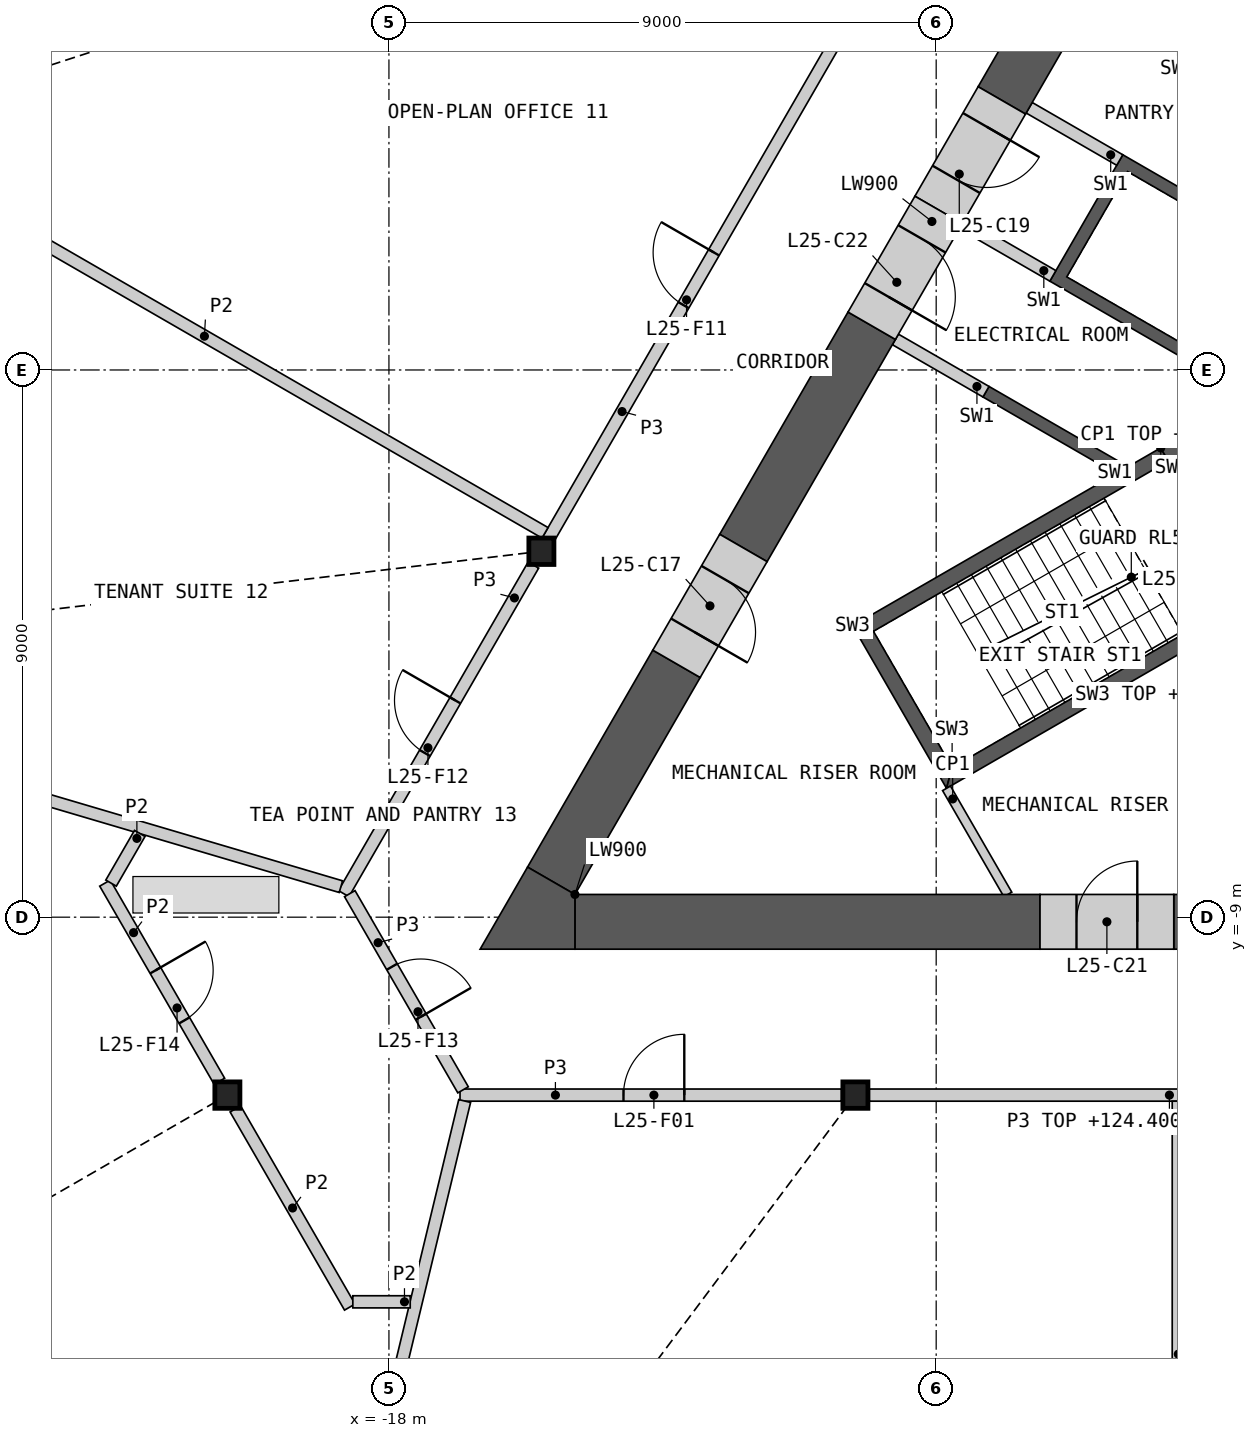
"""IFC4 building model, lengths in metres.
Left out: names, types, materials, properties, quantities, classifications, styles, units other than length and angle.
Written with IfcOpenShell. Run it as: python <this file> out.ifc"""

import sys

from ifc_helpers import new_model, si_unit, direction, frame, frame_2d, origin, origin_2d, place, context, subcontext, project, spatial, polyline, rectangle, i_section, outline, extrude, element, fill, save


model = new_model("IFC4")
c1 = context("Model", 3, precision=1e-05, world=origin(), true_north=direction((0.0, 1.0)))
c2 = subcontext(c1, "Body", "Model", "MODEL_VIEW")
j1 = project(units=[si_unit("LENGTHUNIT", "METRE"), si_unit("PLANEANGLEUNIT", "RADIAN")], contexts=[c1])
p1 = place(None, origin())
s1 = spatial("IfcSite", under=j1, at=p1, CompositionType="ELEMENT")
p2 = place(p1, origin())
s2 = spatial("IfcBuilding", under=s1, at=p2, CompositionType="ELEMENT")
p3 = place(p2, frame((0.0, 0.0, 120.6)))
s3 = spatial("IfcBuildingStorey", under=s2, at=p3, CompositionType="ELEMENT", Elevation=120.6)
for number, where, z_axis, x_axis in (
    (1, (-15.493, -2.982, 0.0), (0.0, 0.0, 1.0), (1.0, 0.0, 0.0)),
    (2, (-20.657, -11.926, 0.0), (0.0, 0.0, 1.0), (1.0, 0.0, 0.0)),
    (3, (-10.328, -11.926, 0.0), (0.0, 0.0, 1.0), (1.0, 0.0, 0.0)),
):
    element("IfcColumn", number, at=place(p3, frame(where, z_axis=z_axis, x_axis=x_axis)), inside=s3, PredefinedType="COLUMN", context=c2, shape_type="SweptSolid", body=[
        extrude(i_section(OverallWidth=0.412, OverallDepth=0.435, WebThickness=0.036, FlangeThickness=0.057, at=origin_2d()), origin(), (0.0, 0.0, 1.0), 4.2),
    ])
p4 = place(p3, origin())
e4 = element("IfcWall", 4, at=p4, inside=s3, PredefinedType="SHEAR", context=c2, shape_type="SweptSolid", body=[
    extrude(outline(polyline([(-6.061, -1.697), (-8.231, -0.444), (-8.131, -0.271), (-5.96, -1.524), (-6.061, -1.697)])), origin(), (0.0, 0.0, 1.0), 3.8),
])
p5 = place(p3, origin())
e5 = element("IfcWall", 5, at=p5, inside=s3, PredefinedType="SHEAR", context=c2, shape_type="SweptSolid", body=[
    extrude(outline(polyline([(-4.96, 0.208), (-7.131, 1.461), (-5.931, 3.54), (-3.76, 2.287), (-3.861, 2.113), (-5.852, 3.263), (-6.852, 1.531), (-4.861, 0.381), (-4.96, 0.208)])), origin(), (0.0, 0.0, 1.0), 3.8),
])
p6 = place(p3, frame((-5.981, 3.453, 0.0), z_axis=(0.0, 0.0, 1.0), x_axis=(-0.866060346521, 0.499939472521, 0.0)))
e6 = element("IfcWall", 6, at=p6, inside=s3, PredefinedType="SHEAR", context=c2, shape_type="SweptSolid", body=[
    extrude(rectangle(XDim=1.72, YDim=0.2, at=frame_2d((0.86, 0.0))), origin(), (0.0, 0.0, 1.0), 3.8),
])
for number, where, z_axis, x_axis in (
    (7, (-7.081, 1.548, 0.0), (0.0, 0.0, 1.0), (-0.866, 0.5, 0.0)),
    (8, (-8.181, -0.357, 0.0), (0.0, 0.0, 1.0), (-0.866, 0.5, 0.0)),
):
    element("IfcWall", number, at=place(p3, frame(where, z_axis=z_axis, x_axis=x_axis)), inside=s3, PredefinedType="SHEAR", context=c2, shape_type="SweptSolid", body=[
        extrude(rectangle(XDim=1.72, YDim=0.2, at=frame_2d((0.86, 0.0))), origin(), (0.0, 0.0, 1.0), 3.8),
    ])
p7 = place(p3, origin())
e9 = element("IfcWall", 9, at=p7, inside=s3, PredefinedType="SHEAR", context=c2, shape_type="SweptSolid", body=[
    extrude(outline(polyline([(-5.307, -1.281), (-10.374, -4.206), (-10.032, -4.298), (-5.182, -1.498), (-5.307, -1.281)])), origin(), (0.0, 0.0, 1.0), 3.8),
])
p8 = place(p3, origin())
e10 = element("IfcWall", 10, at=p8, inside=s3, PredefinedType="SHEAR", context=c2, shape_type="SweptSolid", body=[
    extrude(outline(polyline([(-10.374, -4.206), (-8.83, -6.881), (-8.738, -6.539), (-10.032, -4.298), (-10.374, -4.206)])), origin(), (0.0, 0.0, 1.0), 3.8),
])
p9 = place(p3, origin())
e11 = element("IfcWall", 11, at=p9, inside=s3, PredefinedType="SHEAR", context=c2, shape_type="SweptSolid", body=[
    extrude(outline(polyline([(-8.738, -6.539), (-8.83, -6.881), (-3.763, -3.956), (-3.888, -3.739), (-8.738, -6.539)])), origin(), (0.0, 0.0, 1.0), 3.8),
])
p10 = place(p3, frame((-5.199, -1.219, 0.0), z_axis=(0.0, 0.0, 1.0), x_axis=(0.499982516597, -0.866035497597, 0.0)))
e12 = element("IfcWall", 12, at=p10, inside=s3, PredefinedType="SHEAR", context=c2, shape_type="SweptSolid", body=[
    extrude(rectangle(XDim=3.088, YDim=0.25, at=frame_2d((1.544, 0.0))), origin(), (0.0, 0.0, 1.0), 3.8),
])
p11 = place(p10, frame((0.994, 0.0, 0.0)))
e13 = element("IfcOpeningElement", 13, at=p11, cuts=e12, PredefinedType="OPENING", context=c2, shape_type="SweptSolid", body=[
    extrude(rectangle(XDim=1.1, YDim=2.1, at=frame_2d((0.55, 1.05))), frame((0.0, 0.135, 0.0), z_axis=(0.0, -1.0, 0.0), x_axis=(1.0, 0.0, 0.0)), (0.0, 0.0, 1.0), 0.27),
])
p12 = place(p3, frame((-8.83, -6.881, 0.0), z_axis=(0.0, 0.0, 1.0), x_axis=(0.500085890408, -0.865975809255, 0.0)))
e14 = element("IfcWall", 14, at=p12, inside=s3, PredefinedType="PARTITIONING", context=c2, shape_type="SweptSolid", body=[
    extrude(rectangle(XDim=2.016, YDim=0.15, at=frame_2d((1.008, 0.0))), origin(), (0.0, 0.0, 1.0), 3.8),
])
p13 = place(p3, frame((-14.941, -9.076, 0.0), z_axis=(0.0, 0.0, 1.0), x_axis=(1.0, 0.0, 0.0)))
e15 = element("IfcWall", 15, at=p13, inside=s3, PredefinedType="SHEAR", context=c2, shape_type="SweptSolid", body=[
    extrude(rectangle(XDim=7.649, YDim=0.9, at=frame_2d((3.824, 0.0))), origin(), (0.0, 0.0, 1.0), 3.8),
])
p14 = place(p3, frame((-5.093, -9.076, 0.0), z_axis=(0.0, 0.0, 1.0), x_axis=(1.0, 0.0, 0.0)))
e16 = element("IfcWall", 16, at=p14, inside=s3, PredefinedType="SHEAR", context=c2, shape_type="SweptSolid", body=[
    extrude(rectangle(XDim=3.992, YDim=0.9, at=frame_2d((1.996, 0.0))), origin(), (0.0, 0.0, 1.0), 3.8),
])
p15 = place(p3, frame((-3.55, 12.004, 0.0), z_axis=(0.0, 0.0, 1.0), x_axis=(-0.499993245289, -0.866029303583, 0.0)))
e17 = element("IfcWall", 17, at=p15, inside=s3, PredefinedType="SHEAR", context=c2, shape_type="SweptSolid", body=[
    extrude(rectangle(XDim=8.741, YDim=0.9, at=frame_2d((4.37, 0.0))), origin(), (0.0, 0.0, 1.0), 3.8),
])
p16 = place(p3, frame((-10.06, 0.728, 0.0), z_axis=(0.0, 0.0, 1.0), x_axis=(-0.500021220092, -0.866013152012, 0.0)))
e18 = element("IfcWall", 18, at=p16, inside=s3, PredefinedType="SHEAR", context=c2, shape_type="SweptSolid", body=[
    extrude(rectangle(XDim=4.22, YDim=0.9, at=frame_2d((2.11, 0.0))), origin(), (0.0, 0.0, 1.0), 3.8),
])
p17 = place(p3, frame((-13.271, -4.833, 0.0), z_axis=(0.0, 0.0, 1.0), x_axis=(-0.499994272862, -0.866028710324, 0.0)))
e19 = element("IfcWall", 19, at=p17, inside=s3, PredefinedType="SHEAR", context=c2, shape_type="SweptSolid", body=[
    extrude(rectangle(XDim=4.121, YDim=0.9, at=frame_2d((2.06, 0.0))), origin(), (0.0, 0.0, 1.0), 3.8),
])
p18 = place(p3, origin())
e20 = element("IfcWall", 20, at=p18, inside=s3, PredefinedType="SHEAR", context=c2, shape_type="SweptSolid", body=[
    extrude(outline(polyline([(-14.941, -8.626), (-14.941, -9.526), (-16.5, -9.526), (-15.721, -8.176), (-14.941, -8.626)])), origin(), (0.0, 0.0, 1.0), 3.8),
])
p19 = place(p3, frame((-12.171, -2.927, 0.0), z_axis=(0.0, 0.0, 1.0), x_axis=(-0.499946605688, -0.86605622881, 0.0)))
e21 = element("IfcWall", 21, at=p19, inside=s3, PredefinedType="SHEAR", context=c2, shape_type="SweptSolid", body=[
    extrude(rectangle(XDim=2.2, YDim=0.9, at=frame_2d((1.1, 0.0))), origin(), (0.0, 0.0, 1.0), 3.8),
])
p20 = place(p19, frame((0.6, 0.0, 0.0)))
e22 = element("IfcOpeningElement", 22, at=p20, cuts=e21, PredefinedType="OPENING", context=c2, shape_type="SweptSolid", body=[
    extrude(rectangle(XDim=1.0, YDim=2.1, at=frame_2d((0.5, 1.05))), frame((0.0, 0.46, 0.0), z_axis=(0.0, -1.0, 0.0), x_axis=(1.0, 0.0, 0.0)), (0.0, 0.0, 1.0), 0.92),
])
p21 = place(p3, frame((-7.92, 4.434, 0.0), z_axis=(0.0, 0.0, 1.0), x_axis=(-0.499939227269, -0.866060488094, 0.0)))
e23 = element("IfcWall", 23, at=p21, inside=s3, PredefinedType="SHEAR", context=c2, shape_type="SweptSolid", body=[
    extrude(rectangle(XDim=2.08, YDim=0.9, at=frame_2d((1.04, 0.0))), origin(), (0.0, 0.0, 1.0), 3.8),
])
p22 = place(p21, frame((0.5, 0.0, 0.0)))
e24 = element("IfcOpeningElement", 24, at=p22, cuts=e23, PredefinedType="OPENING", context=c2, shape_type="SweptSolid", body=[
    extrude(rectangle(XDim=1.0, YDim=2.1, at=frame_2d((0.5, 1.05))), frame((0.0, 0.46, 0.0), z_axis=(0.0, -1.0, 0.0), x_axis=(1.0, 0.0, 0.0)), (0.0, 0.0, 1.0), 0.92),
])
p23 = place(p3, frame((-7.292, -9.076, 0.0), z_axis=(0.0, 0.0, 1.0), x_axis=(1.0, 0.0, 0.0)))
e25 = element("IfcWall", 25, at=p23, inside=s3, PredefinedType="SHEAR", context=c2, shape_type="SweptSolid", body=[
    extrude(rectangle(XDim=2.2, YDim=0.9, at=frame_2d((1.1, 0.0))), origin(), (0.0, 0.0, 1.0), 3.8),
])
p24 = place(p23, frame((0.6, 0.0, 0.0)))
e26 = element("IfcOpeningElement", 26, at=p24, cuts=e25, PredefinedType="OPENING", context=c2, shape_type="SweptSolid", body=[
    extrude(rectangle(XDim=1.0, YDim=2.1, at=frame_2d((0.5, 1.05))), frame((0.0, 0.46, 0.0), z_axis=(0.0, -1.0, 0.0), x_axis=(1.0, 0.0, 0.0)), (0.0, 0.0, 1.0), 0.92),
])
p25 = place(p3, frame((-8.96, 2.633, 0.0), z_axis=(0.0, 0.0, 1.0), x_axis=(-0.50002983664, -0.866008176907, 0.0)))
e27 = element("IfcWall", 27, at=p25, inside=s3, PredefinedType="SHEAR", context=c2, shape_type="SweptSolid", body=[
    extrude(rectangle(XDim=2.2, YDim=0.9, at=frame_2d((1.1, 0.0))), origin(), (0.0, 0.0, 1.0), 3.8),
])
p26 = place(p25, frame((0.55, 0.0, 0.0)))
e28 = element("IfcOpeningElement", 28, at=p26, cuts=e27, PredefinedType="OPENING", context=c2, shape_type="SweptSolid", body=[
    extrude(rectangle(XDim=1.1, YDim=2.1, at=frame_2d((0.55, 1.05))), frame((0.0, 0.46, 0.0), z_axis=(0.0, -1.0, 0.0), x_axis=(1.0, 0.0, 0.0)), (0.0, 0.0, 1.0), 0.92),
])
p27 = place(p3, frame((-10.101, -11.926, 0.0), z_axis=(0.0, 0.0, 1.0), x_axis=(1.0, 0.0, 0.0)))
e29 = element("IfcWall", 29, at=p27, inside=s3, PredefinedType="PARTITIONING", context=c2, shape_type="SweptSolid", body=[
    extrude(rectangle(XDim=9.874, YDim=0.2, at=frame_2d((4.937, 0.0))), origin(), (0.0, 0.0, 1.0), 3.8),
])
p28 = place(p27, frame((7.01, 0.0, 0.0)))
e30 = element("IfcOpeningElement", 30, at=p28, cuts=e29, PredefinedType="OPENING", context=c2, shape_type="SweptSolid", body=[
    extrude(rectangle(XDim=1.0, YDim=2.1, at=frame_2d((0.5, 1.05))), frame((0.0, 0.11, 0.0), z_axis=(0.0, -1.0, 0.0), x_axis=(1.0, 0.0, 0.0)), (0.0, 0.0, 1.0), 0.22),
])
p29 = place(p3, frame((-15.402, -2.823, 0.0), z_axis=(0.0, 0.0, 1.0), x_axis=(0.500023237168, 0.866011987384, 0.0)))
e31 = element("IfcWall", 31, at=p29, inside=s3, PredefinedType="PARTITIONING", context=c2, shape_type="SweptSolid", body=[
    extrude(rectangle(XDim=9.883, YDim=0.2, at=frame_2d((4.942, 0.0))), origin(), (0.0, 0.0, 1.0), 3.8),
])
p30 = place(p29, frame((4.492, 0.0, 0.0)))
e32 = element("IfcOpeningElement", 32, at=p30, cuts=e31, PredefinedType="OPENING", context=c2, shape_type="SweptSolid", body=[
    extrude(rectangle(XDim=1.0, YDim=2.1, at=frame_2d((0.5, 1.05))), frame((0.0, 0.11, 0.0), z_axis=(0.0, -1.0, 0.0), x_axis=(1.0, 0.0, 0.0)), (0.0, 0.0, 1.0), 0.22),
])
p31 = place(p3, frame((-16.831, -11.926, 0.0), z_axis=(0.0, 0.0, 1.0), x_axis=(1.0, 0.0, 0.0)))
e33 = element("IfcWall", 33, at=p31, inside=s3, PredefinedType="PARTITIONING", context=c2, shape_type="SweptSolid", body=[
    extrude(rectangle(XDim=6.275, YDim=0.2, at=frame_2d((3.137, 0.0))), origin(), (0.0, 0.0, 1.0), 3.8),
])
p32 = place(p31, frame((2.688, 0.0, 0.0)))
e34 = element("IfcOpeningElement", 34, at=p32, cuts=e33, PredefinedType="OPENING", context=c2, shape_type="SweptSolid", body=[
    extrude(rectangle(XDim=1.0, YDim=2.1, at=frame_2d((0.5, 1.05))), frame((0.0, 0.11, 0.0), z_axis=(0.0, -1.0, 0.0), x_axis=(1.0, 0.0, 0.0)), (0.0, 0.0, 1.0), 0.22),
])
p33 = place(p3, frame((-18.744, -8.613, 0.0), z_axis=(0.0, 0.0, 1.0), x_axis=(0.499997920671, 0.866026604282, 0.0)))
e35 = element("IfcWall", 35, at=p33, inside=s3, PredefinedType="PARTITIONING", context=c2, shape_type="SweptSolid", body=[
    extrude(rectangle(XDim=6.24, YDim=0.2, at=frame_2d((3.12, 0.0))), origin(), (0.0, 0.0, 1.0), 3.8),
])
p34 = place(p33, frame((2.67, 0.0, 0.0)))
e36 = element("IfcOpeningElement", 36, at=p34, cuts=e35, PredefinedType="OPENING", context=c2, shape_type="SweptSolid", body=[
    extrude(rectangle(XDim=1.0, YDim=2.1, at=frame_2d((0.5, 1.05))), frame((0.0, 0.11, 0.0), z_axis=(0.0, -1.0, 0.0), x_axis=(1.0, 0.0, 0.0)), (0.0, 0.0, 1.0), 0.22),
])
p35 = place(p3, frame((-18.644, -8.613, 0.0), z_axis=(0.0, 0.0, 1.0), x_axis=(0.499958791762, -0.866049194065, 0.0)))
e37 = element("IfcWall", 37, at=p35, inside=s3, PredefinedType="PARTITIONING", context=c2, shape_type="SweptSolid", body=[
    extrude(rectangle(XDim=3.726, YDim=0.2, at=frame_2d((1.863, 0.0))), origin(), (0.0, 0.0, 1.0), 3.8),
])
p36 = place(p35, frame((1.388, 0.0, 0.0)))
e38 = element("IfcOpeningElement", 38, at=p36, cuts=e37, PredefinedType="OPENING", context=c2, shape_type="SweptSolid", body=[
    extrude(rectangle(XDim=0.95, YDim=2.1, at=frame_2d((0.475, 1.05))), frame((0.0, 0.11, 0.0), z_axis=(0.0, -1.0, 0.0), x_axis=(1.0, 0.0, 0.0)), (0.0, 0.0, 1.0), 0.22),
])
p37 = place(p3, frame((-19.94, -25.244, 0.0), z_axis=(0.0, 0.0, 1.0), x_axis=(0.234226353532, 0.972182089586, 0.0)))
e39 = element("IfcWall", 39, at=p37, inside=s3, PredefinedType="PARTITIONING", context=c2, shape_type="SweptSolid", body=[
    extrude(rectangle(XDim=13.599, YDim=0.2, at=frame_2d((6.8, 0.0))), origin(), (0.0, 0.0, 1.0), 2.885),
])
p38 = place(p3, frame((-31.736, -4.675, 0.0), z_axis=(0.0, 0.0, 1.0), x_axis=(0.959053889024, -0.283223653581, 0.0)))
e40 = element("IfcWall", 40, at=p38, inside=s3, PredefinedType="PARTITIONING", context=c2, shape_type="SweptSolid", body=[
    extrude(rectangle(XDim=13.499, YDim=0.2, at=frame_2d((6.75, 0.0))), origin(), (0.0, 0.0, 1.0), 2.885),
])
p39 = place(p3, frame((-26.636, 3.79, 0.0), z_axis=(0.0, 0.0, 1.0), x_axis=(0.866029074283, -0.499993642455, 0.0)))
e41 = element("IfcWall", 41, at=p39, inside=s3, PredefinedType="PARTITIONING", context=c2, shape_type="SweptSolid", body=[
    extrude(rectangle(XDim=12.936, YDim=0.2, at=frame_2d((6.468, 0.0))), origin(), (0.0, 0.0, 1.0), 2.885),
])
p40 = place(p3, frame((-5.018, -20.347, 0.0), z_axis=(0.0, 0.0, 1.0), x_axis=(0.0, 1.0, 0.0)))
e42 = element("IfcWall", 42, at=p40, inside=s3, PredefinedType="PARTITIONING", context=c2, shape_type="SweptSolid", body=[
    extrude(rectangle(XDim=8.321, YDim=0.2, at=frame_2d((4.16, 0.0))), origin(), (0.0, 0.0, 1.0), 2.885),
])
p41 = place(p3, frame((-20.526, -12.154, 0.0), z_axis=(0.0, 0.0, 1.0), x_axis=(0.500046282919, -0.86599868068, 0.0)))
e43 = element("IfcWall", 43, at=p41, inside=s3, PredefinedType="PARTITIONING", context=c2, shape_type="SweptSolid", body=[
    extrude(rectangle(XDim=3.763, YDim=0.2, at=frame_2d((1.882, 0.0))), origin(), (0.0, 0.0, 1.0), 2.885),
])
p42 = place(p3, frame((-22.67, -8.44, 0.0), z_axis=(0.0, 0.0, 1.0), x_axis=(0.500018191375, -0.866014900734, 0.0)))
e44 = element("IfcWall", 44, at=p42, inside=s3, PredefinedType="PARTITIONING", context=c2, shape_type="SweptSolid", body=[
    extrude(rectangle(XDim=3.763, YDim=0.2, at=frame_2d((1.882, 0.0))), origin(), (0.0, 0.0, 1.0), 2.885),
])
p43 = place(p42, frame((1.658, 0.0, 0.0)))
e45 = element("IfcOpeningElement", 45, at=p43, cuts=e44, PredefinedType="OPENING", context=c2, shape_type="SweptSolid", body=[
    extrude(rectangle(XDim=0.95, YDim=2.1, at=frame_2d((0.475, 1.05))), frame((0.0, 0.11, 0.0), z_axis=(0.0, -1.0, 0.0), x_axis=(1.0, 0.0, 0.0)), (0.0, 0.0, 1.0), 0.22),
])
for number, where, z_axis, x_axis in (
    (46, (-18.594, -15.326, 0.0), (0.0, 0.0, 1.0), (1.0, 0.0, 0.0)),
    (47, (-22.57, -8.44, 0.0), (0.0, 0.0, 1.0), (0.5, 0.866, 0.0)),
):
    element("IfcWall", number, at=place(p3, frame(where, z_axis=z_axis, x_axis=x_axis)), inside=s3, PredefinedType="PARTITIONING", context=c2, shape_type="SweptSolid", body=[
        extrude(rectangle(XDim=0.944, YDim=0.2, at=frame_2d((0.472, 0.0))), origin(), (0.0, 0.0, 1.0), 2.885),
    ])
p44 = place(p20, origin())
e48 = element("IfcDoor", 48, at=p44, inside=s3, OperationType="SINGLE_SWING_RIGHT", PredefinedType="DOOR", context=c2, shape_type="SweptSolid", body=[
    extrude(rectangle(XDim=1.0, YDim=2.1, at=frame_2d((0.5, 1.05))), frame((0.0, 0.205, 0.0), z_axis=(0.0, -1.0, 0.0), x_axis=(1.0, 0.0, 0.0)), (0.0, 0.0, 1.0), 0.05),
])
fill(e22, e48)
p45 = place(p22, origin())
e49 = element("IfcDoor", 49, at=p45, inside=s3, OperationType="SINGLE_SWING_LEFT", PredefinedType="DOOR", context=c2, shape_type="SweptSolid", body=[
    extrude(rectangle(XDim=1.0, YDim=2.1, at=frame_2d((0.5, 1.05))), frame((0.0, 0.205, 0.0), z_axis=(0.0, -1.0, 0.0), x_axis=(1.0, 0.0, 0.0)), (0.0, 0.0, 1.0), 0.05),
])
fill(e24, e49)
p46 = place(p24, origin())
e50 = element("IfcDoor", 50, at=p46, inside=s3, OperationType="SINGLE_SWING_RIGHT", PredefinedType="DOOR", context=c2, shape_type="SweptSolid", body=[
    extrude(rectangle(XDim=1.0, YDim=2.1, at=frame_2d((0.5, 1.05))), frame((0.0, 0.205, 0.0), z_axis=(0.0, -1.0, 0.0), x_axis=(1.0, 0.0, 0.0)), (0.0, 0.0, 1.0), 0.05),
])
fill(e26, e50)
p47 = place(p26, origin())
e51 = element("IfcDoor", 51, at=p47, inside=s3, OperationType="SINGLE_SWING_RIGHT", PredefinedType="DOOR", context=c2, shape_type="SweptSolid", body=[
    extrude(rectangle(XDim=1.1, YDim=2.1, at=frame_2d((0.55, 1.05))), frame((0.0, 0.205, 0.0), z_axis=(0.0, -1.0, 0.0), x_axis=(1.0, 0.0, 0.0)), (0.0, 0.0, 1.0), 0.05),
])
fill(e28, e51)
p48 = place(p32, origin())
e52 = element("IfcDoor", 52, at=p48, inside=s3, OperationType="SINGLE_SWING_RIGHT", PredefinedType="DOOR", context=c2, shape_type="SweptSolid", body=[
    extrude(rectangle(XDim=1.0, YDim=2.1, at=frame_2d((0.5, 1.05))), frame((0.0, 0.025, 0.0), z_axis=(0.0, -1.0, 0.0), x_axis=(1.0, 0.0, 0.0)), (0.0, 0.0, 1.0), 0.05),
])
fill(e34, e52)
p49 = place(p30, origin())
e53 = element("IfcDoor", 53, at=p49, inside=s3, OperationType="SINGLE_SWING_RIGHT", PredefinedType="DOOR", context=c2, shape_type="SweptSolid", body=[
    extrude(rectangle(XDim=1.0, YDim=2.1, at=frame_2d((0.5, 1.05))), frame((0.0, 0.025, 0.0), z_axis=(0.0, -1.0, 0.0), x_axis=(1.0, 0.0, 0.0)), (0.0, 0.0, 1.0), 0.05),
])
fill(e32, e53)
p50 = place(p34, origin())
e54 = element("IfcDoor", 54, at=p50, inside=s3, OperationType="SINGLE_SWING_RIGHT", PredefinedType="DOOR", context=c2, shape_type="SweptSolid", body=[
    extrude(rectangle(XDim=1.0, YDim=2.1, at=frame_2d((0.5, 1.05))), frame((0.0, 0.025, 0.0), z_axis=(0.0, -1.0, 0.0), x_axis=(1.0, 0.0, 0.0)), (0.0, 0.0, 1.0), 0.05),
])
fill(e36, e54)
p51 = place(p36, origin())
e55 = element("IfcDoor", 55, at=p51, inside=s3, OperationType="SINGLE_SWING_RIGHT", PredefinedType="DOOR", context=c2, shape_type="SweptSolid", body=[
    extrude(rectangle(XDim=0.95, YDim=2.1, at=frame_2d((0.475, 1.05))), frame((0.0, 0.025, 0.0), z_axis=(0.0, -1.0, 0.0), x_axis=(1.0, 0.0, 0.0)), (0.0, 0.0, 1.0), 0.05),
])
fill(e38, e55)
p52 = place(p43, origin())
e56 = element("IfcDoor", 56, at=p52, inside=s3, OperationType="SINGLE_SWING_LEFT", PredefinedType="DOOR", context=c2, shape_type="SweptSolid", body=[
    extrude(rectangle(XDim=0.95, YDim=2.1, at=frame_2d((0.475, 1.05))), frame((0.0, 0.025, 0.0), z_axis=(0.0, -1.0, 0.0), x_axis=(1.0, 0.0, 0.0)), (0.0, 0.0, 1.0), 0.05),
])
fill(e45, e56)
save(model, sys.argv[1])
